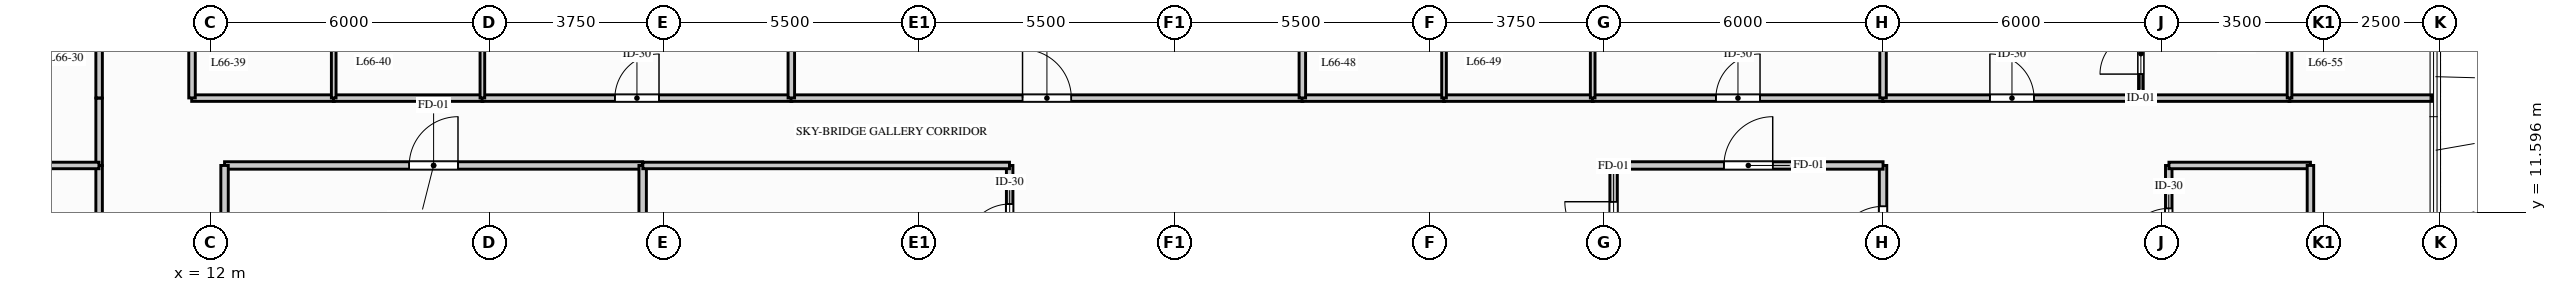
"""IFC4 building model, lengths in metres.
Left out: names, types, materials, properties, quantities, classifications, styles, units other than length and angle.
Written with IfcOpenShell. Run it as: python <this file> out.ifc"""

import sys

from ifc_helpers import new_model, si_unit, direction, frame, frame_2d, origin, place, context, subcontext, project, spatial, rectangle, extrude, element, fill, save


model = new_model("IFC4")
c1 = context("Model", 3, precision=1e-05, world=origin(), true_north=direction((0.0, 1.0)))
c2 = subcontext(c1, "Body", "Model", "MODEL_VIEW")
j1 = project(units=[si_unit("LENGTHUNIT", "METRE"), si_unit("PLANEANGLEUNIT", "RADIAN")], contexts=[c1])
p1 = place(None, origin())
s1 = spatial("IfcSite", under=j1, at=p1, CompositionType="ELEMENT")
p2 = place(p1, origin())
s2 = spatial("IfcBuilding", under=s1, at=p2, CompositionType="ELEMENT")
p3 = place(p2, frame((0.0, 0.0, 218.0)))
s3 = spatial("IfcBuildingStorey", under=s2, at=p3, CompositionType="ELEMENT", Elevation=218.0)
p4 = place(p3, frame((29.2, 9.989, 0.0), z_axis=(0.0, 0.0, 1.0), x_axis=(0.0, 1.0, 0.0)))
e1 = element("IfcWall", 1, at=p4, inside=s3, PredefinedType="PARTITIONING", context=c2, shape_type="SweptSolid", body=[
    extrude(rectangle(XDim=2.611, YDim=0.14, at=frame_2d((1.306, 0.0))), origin(), (0.0, 0.0, 1.0), 2.325),
])
p5 = place(p4, frame((0.831, 0.0, 0.0)))
e2 = element("IfcOpeningElement", 2, at=p5, cuts=e1, PredefinedType="OPENING", context=c2, shape_type="SweptSolid", body=[
    extrude(rectangle(XDim=0.95, YDim=2.05, at=frame_2d((0.475, 1.025))), frame((0.0, 0.08, 0.0), z_axis=(0.0, -1.0, 0.0), x_axis=(1.0, 0.0, 0.0)), (0.0, 0.0, 1.0), 0.16),
])
p6 = place(p3, frame((12.3, 12.6, 0.0), z_axis=(0.0, 0.0, 1.0), x_axis=(1.0, 0.0, 0.0)))
e3 = element("IfcWall", 3, at=p6, inside=s3, PredefinedType="PARTITIONING", context=c2, shape_type="SweptSolid", body=[
    extrude(rectangle(XDim=9.0, YDim=0.16, at=frame_2d((4.5, 0.0))), origin(), (0.0, 0.0, 1.0), 2.325),
])
p7 = place(p6, frame((3.975, 0.0, 0.0)))
e4 = element("IfcOpeningElement", 4, at=p7, cuts=e3, PredefinedType="OPENING", context=c2, shape_type="SweptSolid", body=[
    extrude(rectangle(XDim=1.05, YDim=2.06, at=frame_2d((0.525, 1.03))), frame((0.0, 0.09, 0.0), z_axis=(0.0, -1.0, 0.0), x_axis=(1.0, 0.0, 0.0)), (0.0, 0.0, 1.0), 0.18),
])
p8 = place(p3, frame((12.3, 9.5, 0.0), z_axis=(0.0, 0.0, 1.0), x_axis=(0.0, 1.0, 0.0)))
e5 = element("IfcWall", 5, at=p8, inside=s3, PredefinedType="PARTITIONING", context=c2, shape_type="SweptSolid", body=[
    extrude(rectangle(XDim=3.1, YDim=0.16, at=frame_2d((1.55, 0.0))), origin(), (0.0, 0.0, 1.0), 2.325),
])
p9 = place(p8, frame((1.025, 0.0, 0.0)))
e6 = element("IfcOpeningElement", 6, at=p9, cuts=e5, PredefinedType="OPENING", context=c2, shape_type="SweptSolid", body=[
    extrude(rectangle(XDim=1.05, YDim=2.06, at=frame_2d((0.525, 1.03))), frame((0.0, 0.09, 0.0), z_axis=(0.0, -1.0, 0.0), x_axis=(1.0, 0.0, 0.0)), (0.0, 0.0, 1.0), 0.18),
])
p10 = place(p3, frame((21.3, 9.989, 0.0), z_axis=(0.0, 0.0, 1.0), x_axis=(0.0, 1.0, 0.0)))
e7 = element("IfcWall", 7, at=p10, inside=s3, PredefinedType="PARTITIONING", context=c2, shape_type="SweptSolid", body=[
    extrude(rectangle(XDim=2.611, YDim=0.16, at=frame_2d((1.306, 0.0))), origin(), (0.0, 0.0, 1.0), 2.325),
])
p11 = place(p3, frame((42.2, 9.989, 0.0), z_axis=(0.0, 0.0, 1.0), x_axis=(0.0, 1.0, 0.0)))
e8 = element("IfcWall", 8, at=p11, inside=s3, PredefinedType="PARTITIONING", context=c2, shape_type="SweptSolid", body=[
    extrude(rectangle(XDim=2.611, YDim=0.16, at=frame_2d((1.306, 0.0))), origin(), (0.0, 0.0, 1.0), 2.325),
])
p12 = place(p11, frame((0.781, 0.0, 0.0)))
e9 = element("IfcOpeningElement", 9, at=p12, cuts=e8, PredefinedType="OPENING", context=c2, shape_type="SweptSolid", body=[
    extrude(rectangle(XDim=1.05, YDim=2.06, at=frame_2d((0.525, 1.03))), frame((0.0, 0.09, 0.0), z_axis=(0.0, -1.0, 0.0), x_axis=(1.0, 0.0, 0.0)), (0.0, 0.0, 1.0), 0.18),
])
p13 = place(p3, frame((48.0, 9.789, 0.0), z_axis=(0.0, 0.0, 1.0), x_axis=(0.0, 1.0, 0.0)))
e10 = element("IfcWall", 10, at=p13, inside=s3, PredefinedType="PARTITIONING", context=c2, shape_type="SweptSolid", body=[
    extrude(rectangle(XDim=2.811, YDim=0.16, at=frame_2d((1.406, 0.0))), origin(), (0.0, 0.0, 1.0), 2.325),
])
p14 = place(p13, frame((0.881, 0.0, 0.0)))
e11 = element("IfcOpeningElement", 11, at=p14, cuts=e10, PredefinedType="OPENING", context=c2, shape_type="SweptSolid", body=[
    extrude(rectangle(XDim=1.05, YDim=2.06, at=frame_2d((0.525, 1.03))), frame((0.0, 0.09, 0.0), z_axis=(0.0, -1.0, 0.0), x_axis=(1.0, 0.0, 0.0)), (0.0, 0.0, 1.0), 0.18),
])
p15 = place(p3, frame((42.2, 12.6, 0.0), z_axis=(0.0, 0.0, 1.0), x_axis=(1.0, 0.0, 0.0)))
e12 = element("IfcWall", 12, at=p15, inside=s3, PredefinedType="PARTITIONING", context=c2, shape_type="SweptSolid", body=[
    extrude(rectangle(XDim=5.8, YDim=0.16, at=frame_2d((2.9, 0.0))), origin(), (0.0, 0.0, 1.0), 2.325),
])
p16 = place(p15, frame((2.375, 0.0, 0.0)))
e13 = element("IfcOpeningElement", 13, at=p16, cuts=e12, PredefinedType="OPENING", context=c2, shape_type="SweptSolid", body=[
    extrude(rectangle(XDim=1.05, YDim=2.06, at=frame_2d((0.525, 1.03))), frame((0.0, 0.09, 0.0), z_axis=(0.0, -1.0, 0.0), x_axis=(1.0, 0.0, 0.0)), (0.0, 0.0, 1.0), 0.18),
])
p17 = place(p3, frame((54.15, 9.8, 0.0), z_axis=(0.0, 0.0, 1.0), x_axis=(0.0, 1.0, 0.0)))
e14 = element("IfcWall", 14, at=p17, inside=s3, PredefinedType="PARTITIONING", context=c2, shape_type="SweptSolid", body=[
    extrude(rectangle(XDim=2.8, YDim=0.14, at=frame_2d((1.4, 0.0))), origin(), (0.0, 0.0, 1.0), 2.325),
])
p18 = place(p17, frame((0.925, 0.0, 0.0)))
e15 = element("IfcOpeningElement", 15, at=p18, cuts=e14, PredefinedType="OPENING", context=c2, shape_type="SweptSolid", body=[
    extrude(rectangle(XDim=0.95, YDim=2.05, at=frame_2d((0.475, 1.025))), frame((0.0, 0.08, 0.0), z_axis=(0.0, -1.0, 0.0), x_axis=(1.0, 0.0, 0.0)), (0.0, 0.0, 1.0), 0.16),
])
p19 = place(p3, frame((54.154, 12.6, 0.0), z_axis=(0.0, 0.0, 1.0), x_axis=(1.0, 0.0, 0.0)))
e16 = element("IfcWall", 16, at=p19, inside=s3, PredefinedType="PARTITIONING", context=c2, shape_type="SweptSolid", body=[
    extrude(rectangle(XDim=3.046, YDim=0.14, at=frame_2d((1.523, 0.0))), origin(), (0.0, 0.0, 1.0), 2.89),
])
p20 = place(p3, frame((57.2, 7.2, 0.0), z_axis=(0.0, 0.0, 1.0), x_axis=(0.0, 1.0, 0.0)))
e17 = element("IfcWall", 17, at=p20, inside=s3, PredefinedType="PARTITIONING", context=c2, shape_type="SweptSolid", body=[
    extrude(rectangle(XDim=5.4, YDim=0.14, at=frame_2d((2.7, 0.0))), origin(), (0.0, 0.0, 1.0), 2.325),
])
p21 = place(p3, frame((9.6, 12.6, 0.0), z_axis=(0.0, 0.0, 1.0), x_axis=(0.0, 1.0, 0.0)))
e18 = element("IfcWall", 18, at=p21, inside=s3, PredefinedType="PARTITIONING", context=c2, shape_type="SweptSolid", body=[
    extrude(rectangle(XDim=1.45, YDim=0.14, at=frame_2d((0.725, 0.0))), origin(), (0.0, 0.0, 1.0), 2.89),
])
p22 = place(p3, frame((21.304, 12.6, 0.0), z_axis=(0.0, 0.0, 1.0), x_axis=(1.0, 0.0, 0.0)))
e19 = element("IfcWall", 19, at=p22, inside=s3, PredefinedType="PARTITIONING", context=c2, shape_type="SweptSolid", body=[
    extrude(rectangle(XDim=7.892, YDim=0.14, at=frame_2d((3.946, 0.0))), origin(), (0.0, 0.0, 1.0), 2.325),
])
p23 = place(p3, frame((11.593, 14.05, 0.0), z_axis=(0.0, 0.0, 1.0), x_axis=(1.0, 0.0, 0.0)))
e20 = element("IfcWall", 20, at=p23, inside=s3, PredefinedType="PARTITIONING", context=c2, shape_type="SweptSolid", body=[
    extrude(rectangle(XDim=3.069, YDim=0.14, at=frame_2d((1.534, 0.0))), origin(), (0.0, 0.0, 1.0), 2.325),
])
p24 = place(p3, frame((14.643, 14.05, 0.0), z_axis=(0.0, 0.0, 1.0), x_axis=(1.0, 0.0, 0.0)))
e21 = element("IfcWall", 21, at=p24, inside=s3, PredefinedType="PARTITIONING", context=c2, shape_type="SweptSolid", body=[
    extrude(rectangle(XDim=3.219, YDim=0.14, at=frame_2d((1.609, 0.0))), origin(), (0.0, 0.0, 1.0), 2.89),
])
p25 = place(p3, frame((17.843, 14.05, 0.0), z_axis=(0.0, 0.0, 1.0), x_axis=(1.0, 0.0, 0.0)))
e22 = element("IfcWall", 22, at=p25, inside=s3, PredefinedType="PARTITIONING", context=c2, shape_type="SweptSolid", body=[
    extrude(rectangle(XDim=6.668, YDim=0.14, at=frame_2d((3.334, 0.0))), origin(), (0.0, 0.0, 1.0), 2.325),
])
p26 = place(p25, frame((2.859, 0.0, 0.0)))
e23 = element("IfcOpeningElement", 23, at=p26, cuts=e22, PredefinedType="OPENING", context=c2, shape_type="SweptSolid", body=[
    extrude(rectangle(XDim=0.95, YDim=2.05, at=frame_2d((0.475, 1.025))), frame((0.0, 0.08, 0.0), z_axis=(0.0, -1.0, 0.0), x_axis=(1.0, 0.0, 0.0)), (0.0, 0.0, 1.0), 0.16),
])
p27 = place(p3, frame((24.493, 14.05, 0.0), z_axis=(0.0, 0.0, 1.0), x_axis=(1.0, 0.0, 0.0)))
e24 = element("IfcWall", 24, at=p27, inside=s3, PredefinedType="PARTITIONING", context=c2, shape_type="SweptSolid", body=[
    extrude(rectangle(XDim=11.019, YDim=0.14, at=frame_2d((5.509, 0.0))), origin(), (0.0, 0.0, 1.0), 2.332),
])
p28 = place(p27, frame((4.984, 0.0, 0.0)))
e25 = element("IfcOpeningElement", 25, at=p28, cuts=e24, PredefinedType="OPENING", context=c2, shape_type="SweptSolid", body=[
    extrude(rectangle(XDim=1.05, YDim=2.06, at=frame_2d((0.525, 1.03))), frame((0.0, 0.08, 0.0), z_axis=(0.0, -1.0, 0.0), x_axis=(1.0, 0.0, 0.0)), (0.0, 0.0, 1.0), 0.16),
])
p29 = place(p3, frame((35.493, 14.05, 0.0), z_axis=(0.0, 0.0, 1.0), x_axis=(1.0, 0.0, 0.0)))
e26 = element("IfcWall", 26, at=p29, inside=s3, PredefinedType="PARTITIONING", context=c2, shape_type="SweptSolid", body=[
    extrude(rectangle(XDim=3.069, YDim=0.14, at=frame_2d((1.534, 0.0))), origin(), (0.0, 0.0, 1.0), 2.325),
])
p30 = place(p3, frame((38.543, 14.05, 0.0), z_axis=(0.0, 0.0, 1.0), x_axis=(1.0, 0.0, 0.0)))
e27 = element("IfcWall", 27, at=p30, inside=s3, PredefinedType="PARTITIONING", context=c2, shape_type="SweptSolid", body=[
    extrude(rectangle(XDim=3.219, YDim=0.14, at=frame_2d((1.609, 0.0))), origin(), (0.0, 0.0, 1.0), 2.89),
])
p31 = place(p3, frame((41.743, 14.05, 0.0), z_axis=(0.0, 0.0, 1.0), x_axis=(1.0, 0.0, 0.0)))
e28 = element("IfcWall", 28, at=p31, inside=s3, PredefinedType="PARTITIONING", context=c2, shape_type="SweptSolid", body=[
    extrude(rectangle(XDim=6.269, YDim=0.14, at=frame_2d((3.134, 0.0))), origin(), (0.0, 0.0, 1.0), 2.325),
])
p32 = place(p31, frame((2.659, 0.0, 0.0)))
e29 = element("IfcOpeningElement", 29, at=p32, cuts=e28, PredefinedType="OPENING", context=c2, shape_type="SweptSolid", body=[
    extrude(rectangle(XDim=0.95, YDim=2.05, at=frame_2d((0.475, 1.025))), frame((0.0, 0.08, 0.0), z_axis=(0.0, -1.0, 0.0), x_axis=(1.0, 0.0, 0.0)), (0.0, 0.0, 1.0), 0.16),
])
p33 = place(p3, frame((56.739, 14.05, 0.0), z_axis=(0.0, 0.0, 1.0), x_axis=(1.0, 0.0, 0.0)))
e30 = element("IfcWall", 30, at=p33, inside=s3, PredefinedType="PARTITIONING", context=c2, shape_type="SweptSolid", body=[
    extrude(rectangle(XDim=3.073, YDim=0.14, at=frame_2d((1.536, 0.0))), origin(), (0.0, 0.0, 1.0), 2.89),
])
p34 = place(p3, frame((53.539, 14.05, 0.0), z_axis=(0.0, 0.0, 1.0), x_axis=(1.0, 0.0, 0.0)))
e31 = element("IfcWall", 31, at=p34, inside=s3, PredefinedType="PARTITIONING", context=c2, shape_type="SweptSolid", body=[
    extrude(rectangle(XDim=3.219, YDim=0.14, at=frame_2d((1.609, 0.0))), origin(), (0.0, 0.0, 1.0), 2.325),
])
p35 = place(p3, frame((47.993, 14.05, 0.0), z_axis=(0.0, 0.0, 1.0), x_axis=(1.0, 0.0, 0.0)))
e32 = element("IfcWall", 32, at=p35, inside=s3, PredefinedType="PARTITIONING", context=c2, shape_type="SweptSolid", body=[
    extrude(rectangle(XDim=5.565, YDim=0.14, at=frame_2d((2.782, 0.0))), origin(), (0.0, 0.0, 1.0), 2.325),
])
p36 = place(p35, frame((2.307, 0.0, 0.0)))
e33 = element("IfcOpeningElement", 33, at=p36, cuts=e32, PredefinedType="OPENING", context=c2, shape_type="SweptSolid", body=[
    extrude(rectangle(XDim=0.95, YDim=2.05, at=frame_2d((0.475, 1.025))), frame((0.0, 0.08, 0.0), z_axis=(0.0, -1.0, 0.0), x_axis=(1.0, 0.0, 0.0)), (0.0, 0.0, 1.0), 0.16),
])
p37 = place(p3, frame((9.6, 9.539, 0.0), z_axis=(0.0, 0.0, 1.0), x_axis=(0.0, 1.0, 0.0)))
e34 = element("IfcWall", 34, at=p37, inside=s3, PredefinedType="PARTITIONING", context=c2, shape_type="SweptSolid", body=[
    extrude(rectangle(XDim=3.057, YDim=0.14, at=frame_2d((1.529, 0.0))), origin(), (0.0, 0.0, 1.0), 2.325),
])
p38 = place(p3, frame((7.438, 12.6, 0.0), z_axis=(0.0, 0.0, 1.0), x_axis=(1.0, 0.0, 0.0)))
e35 = element("IfcWall", 35, at=p38, inside=s3, PredefinedType="PARTITIONING", context=c2, shape_type="SweptSolid", body=[
    extrude(rectangle(XDim=2.158, YDim=0.14, at=frame_2d((1.079, 0.0))), origin(), (0.0, 0.0, 1.0), 2.89),
])
p39 = place(p3, frame((9.6, 14.054, 0.0), z_axis=(0.0, 0.0, 1.0), x_axis=(0.0, 1.0, 0.0)))
e36 = element("IfcWall", 36, at=p39, inside=s3, PredefinedType="PARTITIONING", context=c2, shape_type="SweptSolid", body=[
    extrude(rectangle(XDim=1.607, YDim=0.14, at=frame_2d((0.804, 0.0))), origin(), (0.0, 0.0, 1.0), 2.89),
])
p40 = place(p3, frame((11.6, 14.054, 0.0), z_axis=(0.0, 0.0, 1.0), x_axis=(0.0, 1.0, 0.0)))
e37 = element("IfcWall", 37, at=p40, inside=s3, PredefinedType="PARTITIONING", context=c2, shape_type="SweptSolid", body=[
    extrude(rectangle(XDim=2.357, YDim=0.14, at=frame_2d((1.179, 0.0))), origin(), (0.0, 0.0, 1.0), 2.325),
])
for number, where, z_axis, x_axis in (
    (38, (14.65, 14.054, 0.0), (0.0, 0.0, 1.0), (0.0, 1.0, 0.0)),
    (39, (17.85, 14.054, 0.0), (0.0, 0.0, 1.0), (0.0, 1.0, 0.0)),
):
    element("IfcWall", number, at=place(p3, frame(where, z_axis=z_axis, x_axis=x_axis)), inside=s3, PredefinedType="PARTITIONING", context=c2, shape_type="SweptSolid", body=[
        extrude(rectangle(XDim=2.346, YDim=0.1, at=frame_2d((1.173, 0.0))), origin(), (0.0, 0.0, 1.0), 2.325),
    ])
p41 = place(p3, frame((24.5, 14.054, 0.0), z_axis=(0.0, 0.0, 1.0), x_axis=(0.0, 1.0, 0.0)))
e40 = element("IfcWall", 40, at=p41, inside=s3, PredefinedType="PARTITIONING", context=c2, shape_type="SweptSolid", body=[
    extrude(rectangle(XDim=2.342, YDim=0.14, at=frame_2d((1.171, 0.0))), origin(), (0.0, 0.0, 1.0), 2.325),
])
p42 = place(p3, frame((35.5, 14.054, 0.0), z_axis=(0.0, 0.0, 1.0), x_axis=(0.0, 1.0, 0.0)))
e41 = element("IfcWall", 41, at=p42, inside=s3, PredefinedType="PARTITIONING", context=c2, shape_type="SweptSolid", body=[
    extrude(rectangle(XDim=2.357, YDim=0.14, at=frame_2d((1.179, 0.0))), origin(), (0.0, 0.0, 1.0), 2.325),
])
for number, where, z_axis, x_axis in (
    (42, (38.55, 14.054, 0.0), (0.0, 0.0, 1.0), (0.0, 1.0, 0.0)),
    (43, (41.75, 14.054, 0.0), (0.0, 0.0, 1.0), (0.0, 1.0, 0.0)),
):
    element("IfcWall", number, at=place(p3, frame(where, z_axis=z_axis, x_axis=x_axis)), inside=s3, PredefinedType="PARTITIONING", context=c2, shape_type="SweptSolid", body=[
        extrude(rectangle(XDim=2.346, YDim=0.1, at=frame_2d((1.173, 0.0))), origin(), (0.0, 0.0, 1.0), 2.325),
    ])
p43 = place(p3, frame((48.0, 14.054, 0.0), z_axis=(0.0, 0.0, 1.0), x_axis=(0.0, 1.0, 0.0)))
e44 = element("IfcWall", 44, at=p43, inside=s3, PredefinedType="PARTITIONING", context=c2, shape_type="SweptSolid", body=[
    extrude(rectangle(XDim=2.342, YDim=0.14, at=frame_2d((1.171, 0.0))), origin(), (0.0, 0.0, 1.0), 2.325),
])
p44 = place(p3, frame((56.75, 14.054, 0.0), z_axis=(0.0, 0.0, 1.0), x_axis=(0.0, 1.0, 0.0)))
e45 = element("IfcWall", 45, at=p44, inside=s3, PredefinedType="PARTITIONING", context=c2, shape_type="SweptSolid", body=[
    extrude(rectangle(XDim=2.346, YDim=0.1, at=frame_2d((1.173, 0.0))), origin(), (0.0, 0.0, 1.0), 2.325),
])
p45 = place(p3, frame((53.55, 14.054, 0.0), z_axis=(0.0, 0.0, 1.0), x_axis=(0.0, 1.0, 0.0)))
e46 = element("IfcWall", 46, at=p45, inside=s3, PredefinedType="PARTITIONING", context=c2, shape_type="SweptSolid", body=[
    extrude(rectangle(XDim=2.346, YDim=0.1, at=frame_2d((1.173, 0.0))), origin(), (0.0, 0.0, 1.0), 2.325),
])
p46 = place(p45, frame((0.513, 0.0, 0.0)))
e47 = element("IfcOpeningElement", 47, at=p46, cuts=e46, PredefinedType="OPENING", context=c2, shape_type="SweptSolid", body=[
    extrude(rectangle(XDim=0.88, YDim=2.04, at=frame_2d((0.44, 1.02))), frame((0.0, 0.06, 0.0), z_axis=(0.0, -1.0, 0.0), x_axis=(1.0, 0.0, 0.0)), (0.0, 0.0, 1.0), 0.12),
])
p47 = place(p5, origin())
e48 = element("IfcDoor", 48, at=p47, inside=s3, OperationType="SINGLE_SWING_LEFT", PredefinedType="DOOR", context=c2, shape_type="SweptSolid", body=[
    extrude(rectangle(XDim=0.95, YDim=2.05, at=frame_2d((0.475, 1.025))), frame((0.0, 0.025, 0.0), z_axis=(0.0, -1.0, 0.0), x_axis=(1.0, 0.0, 0.0)), (0.0, 0.0, 1.0), 0.05),
])
fill(e2, e48)
p48 = place(p7, origin())
e49 = element("IfcDoor", 49, at=p48, inside=s3, OperationType="SINGLE_SWING_RIGHT", PredefinedType="DOOR", context=c2, shape_type="SweptSolid", body=[
    extrude(rectangle(XDim=1.05, YDim=2.06, at=frame_2d((0.525, 1.03))), frame((0.0, 0.025, 0.0), z_axis=(0.0, -1.0, 0.0), x_axis=(1.0, 0.0, 0.0)), (0.0, 0.0, 1.0), 0.05),
])
fill(e4, e49)
p49 = place(p12, origin())
e50 = element("IfcDoor", 50, at=p49, inside=s3, OperationType="SINGLE_SWING_RIGHT", PredefinedType="DOOR", context=c2, shape_type="SweptSolid", body=[
    extrude(rectangle(XDim=1.05, YDim=2.06, at=frame_2d((0.525, 1.03))), frame((0.0, 0.025, 0.0), z_axis=(0.0, -1.0, 0.0), x_axis=(1.0, 0.0, 0.0)), (0.0, 0.0, 1.0), 0.05),
])
fill(e9, e50)
p50 = place(p14, origin())
e51 = element("IfcDoor", 51, at=p50, inside=s3, OperationType="SINGLE_SWING_LEFT", PredefinedType="DOOR", context=c2, shape_type="SweptSolid", body=[
    extrude(rectangle(XDim=1.05, YDim=2.06, at=frame_2d((0.525, 1.03))), frame((0.0, 0.025, 0.0), z_axis=(0.0, -1.0, 0.0), x_axis=(1.0, 0.0, 0.0)), (0.0, 0.0, 1.0), 0.05),
])
fill(e11, e51)
p51 = place(p16, origin())
e52 = element("IfcDoor", 52, at=p51, inside=s3, OperationType="SINGLE_SWING_RIGHT", PredefinedType="DOOR", context=c2, shape_type="SweptSolid", body=[
    extrude(rectangle(XDim=1.05, YDim=2.06, at=frame_2d((0.525, 1.03))), frame((0.0, 0.025, 0.0), z_axis=(0.0, -1.0, 0.0), x_axis=(1.0, 0.0, 0.0)), (0.0, 0.0, 1.0), 0.05),
])
fill(e13, e52)
p52 = place(p18, origin())
e53 = element("IfcDoor", 53, at=p52, inside=s3, OperationType="SINGLE_SWING_LEFT", PredefinedType="DOOR", context=c2, shape_type="SweptSolid", body=[
    extrude(rectangle(XDim=0.95, YDim=2.05, at=frame_2d((0.475, 1.025))), frame((0.0, 0.025, 0.0), z_axis=(0.0, -1.0, 0.0), x_axis=(1.0, 0.0, 0.0)), (0.0, 0.0, 1.0), 0.05),
])
fill(e15, e53)
p53 = place(p26, origin())
e54 = element("IfcDoor", 54, at=p53, inside=s3, OperationType="SINGLE_SWING_RIGHT", PredefinedType="DOOR", context=c2, shape_type="SweptSolid", body=[
    extrude(rectangle(XDim=0.95, YDim=2.05, at=frame_2d((0.475, 1.025))), frame((0.0, 0.025, 0.0), z_axis=(0.0, -1.0, 0.0), x_axis=(1.0, 0.0, 0.0)), (0.0, 0.0, 1.0), 0.05),
])
fill(e23, e54)
p54 = place(p28, origin())
e55 = element("IfcDoor", 55, at=p54, inside=s3, OperationType="SINGLE_SWING_LEFT", PredefinedType="DOOR", context=c2, shape_type="SweptSolid", body=[
    extrude(rectangle(XDim=1.05, YDim=2.06, at=frame_2d((0.525, 1.03))), frame((0.0, 0.025, 0.0), z_axis=(0.0, -1.0, 0.0), x_axis=(1.0, 0.0, 0.0)), (0.0, 0.0, 1.0), 0.05),
])
fill(e25, e55)
p55 = place(p32, origin())
e56 = element("IfcDoor", 56, at=p55, inside=s3, OperationType="SINGLE_SWING_RIGHT", PredefinedType="DOOR", context=c2, shape_type="SweptSolid", body=[
    extrude(rectangle(XDim=0.95, YDim=2.05, at=frame_2d((0.475, 1.025))), frame((0.0, 0.025, 0.0), z_axis=(0.0, -1.0, 0.0), x_axis=(1.0, 0.0, 0.0)), (0.0, 0.0, 1.0), 0.05),
])
fill(e29, e56)
p56 = place(p36, origin())
e57 = element("IfcDoor", 57, at=p56, inside=s3, OperationType="SINGLE_SWING_LEFT", PredefinedType="DOOR", context=c2, shape_type="SweptSolid", body=[
    extrude(rectangle(XDim=0.95, YDim=2.05, at=frame_2d((0.475, 1.025))), frame((0.0, 0.025, 0.0), z_axis=(0.0, -1.0, 0.0), x_axis=(1.0, 0.0, 0.0)), (0.0, 0.0, 1.0), 0.05),
])
fill(e33, e57)
p57 = place(p46, origin())
e58 = element("IfcDoor", 58, at=p57, inside=s3, OperationType="SINGLE_SWING_LEFT", PredefinedType="DOOR", context=c2, shape_type="SweptSolid", body=[
    extrude(rectangle(XDim=0.88, YDim=2.04, at=frame_2d((0.44, 1.02))), frame((0.0, 0.025, 0.0), z_axis=(0.0, -1.0, 0.0), x_axis=(1.0, 0.0, 0.0)), (0.0, 0.0, 1.0), 0.05),
])
fill(e47, e58)
save(model, sys.argv[1])
